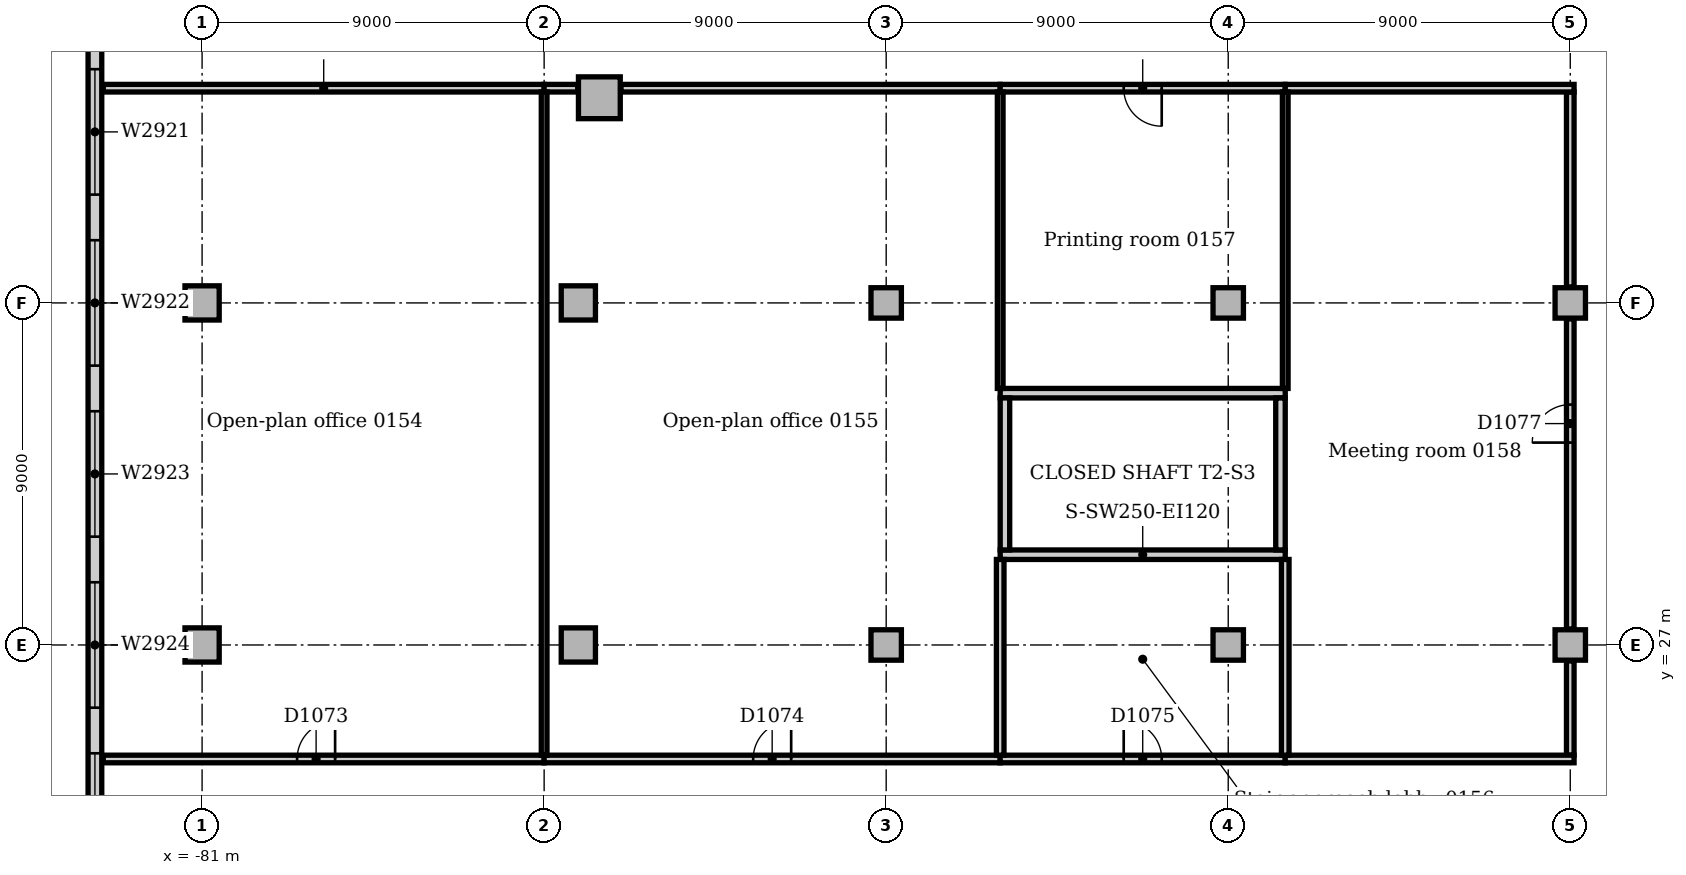
"""IFC4 building model, lengths in metres.
Left out: names, types, materials, properties, quantities, classifications, styles, units other than length and angle.
Written with IfcOpenShell. Run it as: python <this file> out.ifc"""

import sys

from ifc_helpers import new_model, si_unit, direction, frame, frame_2d, origin, origin_2d, place, context, subcontext, project, spatial, rectangle, extrude, element, fill, save


model = new_model("IFC4")
c1 = context("Model", 3, precision=1e-05, world=origin(), true_north=direction((0.0, 1.0)))
c2 = subcontext(c1, "Body", "Model", "MODEL_VIEW")
j1 = project(units=[si_unit("LENGTHUNIT", "METRE"), si_unit("PLANEANGLEUNIT", "RADIAN")], contexts=[c1])
p1 = place(None, origin())
s1 = spatial("IfcSite", under=j1, at=p1, CompositionType="ELEMENT")
p2 = place(p1, origin())
s2 = spatial("IfcBuilding", under=s1, at=p2, CompositionType="ELEMENT")
p3 = place(p2, frame((0.0, 0.0, 6.0)))
s3 = spatial("IfcBuildingStorey", under=s2, at=p3, CompositionType="ELEMENT", Elevation=6.0)
for number, where, z_axis, x_axis in (
    (1, (-60.0, 29.375, 0.0), (0.0, 0.0, 1.0), (1.0, 0.0, 0.0)),
    (2, (-52.5, 33.625, 0.0), (0.0, 0.0, 1.0), (-1.0, 0.0, 0.0)),
):
    element("IfcWall", number, at=place(p3, frame(where, z_axis=z_axis, x_axis=x_axis)), inside=s3, PredefinedType="SOLIDWALL", context=c2, shape_type="SweptSolid", body=[
        extrude(rectangle(XDim=7.5, YDim=0.25, at=frame_2d((3.75, 0.0))), origin(), (0.0, 0.0, 1.0), 5.0),
    ])
for number, where, z_axis, x_axis in (
    (3, (-52.625, 29.5, 0.0), (0.0, 0.0, 1.0), (0.0, 1.0, 0.0)),
    (4, (-59.875, 33.5, 0.0), (0.0, 0.0, 1.0), (0.0, -1.0, 0.0)),
):
    element("IfcWall", number, at=place(p3, frame(where, z_axis=z_axis, x_axis=x_axis)), inside=s3, PredefinedType="SOLIDWALL", context=c2, shape_type="SweptSolid", body=[
        extrude(rectangle(XDim=4.0, YDim=0.25, at=frame_2d((2.0, 0.0))), origin(), (0.0, 0.0, 1.0), 5.0),
    ])
p4 = place(p3, frame((-70.547, 41.398, 0.0), z_axis=(0.0, 0.0, 1.0), x_axis=(1.0, 0.0, 0.0)))
e5 = element("IfcColumn", 5, at=p4, inside=s3, PredefinedType="COLUMN", context=c2, shape_type="SweptSolid", body=[
    extrude(rectangle(XDim=1.1, YDim=1.1, at=origin_2d()), origin(), (0.0, 0.0, 1.0), 4.7),
])
for number, where, z_axis, x_axis in (
    (6, (-71.1, 27.0, 0.0), (0.0, 0.0, 1.0), (1.0, 0.0, 0.0)),
    (7, (-71.1, 36.0, 0.0), (0.0, 0.0, 1.0), (1.0, 0.0, 0.0)),
):
    element("IfcColumn", number, at=place(p3, frame(where, z_axis=z_axis, x_axis=x_axis)), inside=s3, PredefinedType="COLUMN", context=c2, shape_type="SweptSolid", body=[
        extrude(rectangle(XDim=0.9, YDim=0.9, at=origin_2d()), origin(), (0.0, 0.0, 1.0), 4.7),
    ])
for number, where, z_axis, x_axis in (
    (8, (-63.0, 27.0, 0.0), (0.0, 0.0, 1.0), (1.0, 0.0, 0.0)),
    (9, (-63.0, 36.0, 0.0), (0.0, 0.0, 1.0), (1.0, 0.0, 0.0)),
    (10, (-54.0, 27.0, 0.0), (0.0, 0.0, 1.0), (1.0, 0.0, 0.0)),
    (11, (-54.0, 36.0, 0.0), (0.0, 0.0, 1.0), (1.0, 0.0, 0.0)),
    (12, (-45.0, 27.0, 0.0), (0.0, 0.0, 1.0), (1.0, 0.0, 0.0)),
    (13, (-45.0, 36.0, 0.0), (0.0, 0.0, 1.0), (1.0, 0.0, 0.0)),
):
    element("IfcColumn", number, at=place(p3, frame(where, z_axis=z_axis, x_axis=x_axis)), inside=s3, PredefinedType="COLUMN", context=c2, shape_type="SweptSolid", body=[
        extrude(rectangle(XDim=0.8, YDim=0.8, at=origin_2d()), origin(), (0.0, 0.0, 1.0), 4.7),
    ])
for number, where, z_axis, x_axis in (
    (14, (-81.0, 27.0, 0.0), (0.0, 0.0, 1.0), (1.0, 0.0, 0.0)),
    (15, (-81.0, 36.0, 0.0), (0.0, 0.0, 1.0), (1.0, 0.0, 0.0)),
):
    element("IfcColumn", number, at=place(p3, frame(where, z_axis=z_axis, x_axis=x_axis)), inside=s3, PredefinedType="COLUMN", context=c2, shape_type="SweptSolid", body=[
        extrude(rectangle(XDim=0.9, YDim=0.9, at=origin_2d()), origin(), (0.0, 0.0, 1.0), 4.7),
    ])
p5 = place(p3, frame((-83.82, 54.0, 0.0), z_axis=(0.0, 0.0, 1.0), x_axis=(0.0, -1.0, 0.0)))
e16 = element("IfcWall", 16, at=p5, inside=s3, PredefinedType="STANDARD", context=c2, shape_type="SweptSolid", body=[
    extrude(rectangle(XDim=63.0, YDim=0.36, at=frame_2d((31.5, 0.0))), origin(), (0.0, 0.0, 1.0), 4.7),
])
p6 = place(p5, frame((2.85, 0.0, 0.9)))
e17 = element("IfcOpeningElement", 17, at=p6, cuts=e16, PredefinedType="OPENING", context=c2, shape_type="SweptSolid", body=[
    extrude(rectangle(XDim=3.3, YDim=2.4, at=frame_2d((1.65, 1.2))), frame((0.0, 0.19, 0.0), z_axis=(0.0, -1.0, 0.0), x_axis=(1.0, 0.0, 0.0)), (0.0, 0.0, 1.0), 0.38),
])
p7 = place(p5, frame((7.35, 0.0, 0.9)))
e18 = element("IfcOpeningElement", 18, at=p7, cuts=e16, PredefinedType="OPENING", context=c2, shape_type="SweptSolid", body=[
    extrude(rectangle(XDim=3.3, YDim=2.4, at=frame_2d((1.65, 1.2))), frame((0.0, 0.19, 0.0), z_axis=(0.0, -1.0, 0.0), x_axis=(1.0, 0.0, 0.0)), (0.0, 0.0, 1.0), 0.38),
])
p8 = place(p5, frame((11.85, 0.0, 0.9)))
e19 = element("IfcOpeningElement", 19, at=p8, cuts=e16, PredefinedType="OPENING", context=c2, shape_type="SweptSolid", body=[
    extrude(rectangle(XDim=3.3, YDim=2.4, at=frame_2d((1.65, 1.2))), frame((0.0, 0.19, 0.0), z_axis=(0.0, -1.0, 0.0), x_axis=(1.0, 0.0, 0.0)), (0.0, 0.0, 1.0), 0.38),
])
p9 = place(p5, frame((16.35, 0.0, 0.9)))
e20 = element("IfcOpeningElement", 20, at=p9, cuts=e16, PredefinedType="OPENING", context=c2, shape_type="SweptSolid", body=[
    extrude(rectangle(XDim=3.3, YDim=2.4, at=frame_2d((1.65, 1.2))), frame((0.0, 0.19, 0.0), z_axis=(0.0, -1.0, 0.0), x_axis=(1.0, 0.0, 0.0)), (0.0, 0.0, 1.0), 0.38),
])
p10 = place(p5, frame((20.85, 0.0, 0.9)))
e21 = element("IfcOpeningElement", 21, at=p10, cuts=e16, PredefinedType="OPENING", context=c2, shape_type="SweptSolid", body=[
    extrude(rectangle(XDim=3.3, YDim=2.4, at=frame_2d((1.65, 1.2))), frame((0.0, 0.19, 0.0), z_axis=(0.0, -1.0, 0.0), x_axis=(1.0, 0.0, 0.0)), (0.0, 0.0, 1.0), 0.38),
])
p11 = place(p5, frame((25.35, 0.0, 0.9)))
e22 = element("IfcOpeningElement", 22, at=p11, cuts=e16, PredefinedType="OPENING", context=c2, shape_type="SweptSolid", body=[
    extrude(rectangle(XDim=3.3, YDim=2.4, at=frame_2d((1.65, 1.2))), frame((0.0, 0.19, 0.0), z_axis=(0.0, -1.0, 0.0), x_axis=(1.0, 0.0, 0.0)), (0.0, 0.0, 1.0), 0.38),
])
p12 = place(p5, frame((29.85, 0.0, 0.9)))
e23 = element("IfcOpeningElement", 23, at=p12, cuts=e16, PredefinedType="OPENING", context=c2, shape_type="SweptSolid", body=[
    extrude(rectangle(XDim=3.3, YDim=2.4, at=frame_2d((1.65, 1.2))), frame((0.0, 0.19, 0.0), z_axis=(0.0, -1.0, 0.0), x_axis=(1.0, 0.0, 0.0)), (0.0, 0.0, 1.0), 0.38),
])
p13 = place(p5, frame((34.35, 0.0, 0.9)))
e24 = element("IfcOpeningElement", 24, at=p13, cuts=e16, PredefinedType="OPENING", context=c2, shape_type="SweptSolid", body=[
    extrude(rectangle(XDim=3.3, YDim=2.4, at=frame_2d((1.65, 1.2))), frame((0.0, 0.19, 0.0), z_axis=(0.0, -1.0, 0.0), x_axis=(1.0, 0.0, 0.0)), (0.0, 0.0, 1.0), 0.38),
])
p14 = place(p5, frame((38.85, 0.0, 0.9)))
e25 = element("IfcOpeningElement", 25, at=p14, cuts=e16, PredefinedType="OPENING", context=c2, shape_type="SweptSolid", body=[
    extrude(rectangle(XDim=3.3, YDim=2.4, at=frame_2d((1.65, 1.2))), frame((0.0, 0.19, 0.0), z_axis=(0.0, -1.0, 0.0), x_axis=(1.0, 0.0, 0.0)), (0.0, 0.0, 1.0), 0.38),
])
p15 = place(p5, frame((43.35, 0.0, 0.9)))
e26 = element("IfcOpeningElement", 26, at=p15, cuts=e16, PredefinedType="OPENING", context=c2, shape_type="SweptSolid", body=[
    extrude(rectangle(XDim=3.3, YDim=2.4, at=frame_2d((1.65, 1.2))), frame((0.0, 0.19, 0.0), z_axis=(0.0, -1.0, 0.0), x_axis=(1.0, 0.0, 0.0)), (0.0, 0.0, 1.0), 0.38),
])
p16 = place(p5, frame((47.85, 0.0, 0.9)))
e27 = element("IfcOpeningElement", 27, at=p16, cuts=e16, PredefinedType="OPENING", context=c2, shape_type="SweptSolid", body=[
    extrude(rectangle(XDim=3.3, YDim=2.4, at=frame_2d((1.65, 1.2))), frame((0.0, 0.19, 0.0), z_axis=(0.0, -1.0, 0.0), x_axis=(1.0, 0.0, 0.0)), (0.0, 0.0, 1.0), 0.38),
])
p17 = place(p5, frame((52.35, 0.0, 0.9)))
e28 = element("IfcOpeningElement", 28, at=p17, cuts=e16, PredefinedType="OPENING", context=c2, shape_type="SweptSolid", body=[
    extrude(rectangle(XDim=3.3, YDim=2.4, at=frame_2d((1.65, 1.2))), frame((0.0, 0.19, 0.0), z_axis=(0.0, -1.0, 0.0), x_axis=(1.0, 0.0, 0.0)), (0.0, 0.0, 1.0), 0.38),
])
p18 = place(p5, frame((56.85, 0.0, 0.9)))
e29 = element("IfcOpeningElement", 29, at=p18, cuts=e16, PredefinedType="OPENING", context=c2, shape_type="SweptSolid", body=[
    extrude(rectangle(XDim=3.3, YDim=2.4, at=frame_2d((1.65, 1.2))), frame((0.0, 0.19, 0.0), z_axis=(0.0, -1.0, 0.0), x_axis=(1.0, 0.0, 0.0)), (0.0, 0.0, 1.0), 0.38),
])
p19 = place(p3, frame((-45.0, 24.1, 0.0), z_axis=(0.0, 0.0, 1.0), x_axis=(0.0, 1.0, 0.0)))
e30 = element("IfcWall", 30, at=p19, inside=s3, PredefinedType="PARTITIONING", context=c2, shape_type="SweptSolid", body=[
    extrude(rectangle(XDim=2.48, YDim=0.2, at=frame_2d((1.24, 0.0))), origin(), (0.0, 0.0, 1.0), 4.7),
])
p20 = place(p3, frame((-45.0, 27.42, 0.0), z_axis=(0.0, 0.0, 1.0), x_axis=(0.0, 1.0, 0.0)))
e31 = element("IfcWall", 31, at=p20, inside=s3, PredefinedType="PARTITIONING", context=c2, shape_type="SweptSolid", body=[
    extrude(rectangle(XDim=8.16, YDim=0.2, at=frame_2d((4.08, 0.0))), origin(), (0.0, 0.0, 1.0), 4.7),
])
p21 = place(p20, frame((4.905, 0.0, 0.0)))
e32 = element("IfcOpeningElement", 32, at=p21, cuts=e31, PredefinedType="OPENING", context=c2, shape_type="SweptSolid", body=[
    extrude(rectangle(XDim=1.0, YDim=2.1, at=frame_2d((0.5, 1.05))), frame((0.0, 0.11, 0.0), z_axis=(0.0, -1.0, 0.0), x_axis=(1.0, 0.0, 0.0)), (0.0, 0.0, 1.0), 0.22),
])
p22 = place(p3, frame((-45.0, 36.42, 0.0), z_axis=(0.0, 0.0, 1.0), x_axis=(0.0, 1.0, 0.0)))
e33 = element("IfcWall", 33, at=p22, inside=s3, PredefinedType="PARTITIONING", context=c2, shape_type="SweptSolid", body=[
    extrude(rectangle(XDim=5.13, YDim=0.2, at=frame_2d((2.565, 0.0))), origin(), (0.0, 0.0, 1.0), 4.7),
])
p23 = place(p3, frame((-83.6, 24.0, 0.0), z_axis=(0.0, 0.0, 1.0), x_axis=(1.0, 0.0, 0.0)))
e34 = element("IfcWall", 34, at=p23, inside=s3, PredefinedType="PARTITIONING", context=c2, shape_type="SweptSolid", body=[
    extrude(rectangle(XDim=11.6, YDim=0.2, at=frame_2d((5.8, 0.0))), origin(), (0.0, 0.0, 1.0), 4.7),
])
p24 = place(p23, frame((5.1, 0.0, 0.0)))
e35 = element("IfcOpeningElement", 35, at=p24, cuts=e34, PredefinedType="OPENING", context=c2, shape_type="SweptSolid", body=[
    extrude(rectangle(XDim=1.0, YDim=2.1, at=frame_2d((0.5, 1.05))), frame((0.0, 0.11, 0.0), z_axis=(0.0, -1.0, 0.0), x_axis=(1.0, 0.0, 0.0)), (0.0, 0.0, 1.0), 0.22),
])
p25 = place(p3, frame((-72.0, 24.0, 0.0), z_axis=(0.0, 0.0, 1.0), x_axis=(1.0, 0.0, 0.0)))
e36 = element("IfcWall", 36, at=p25, inside=s3, PredefinedType="PARTITIONING", context=c2, shape_type="SweptSolid", body=[
    extrude(rectangle(XDim=12.0, YDim=0.2, at=frame_2d((6.0, 0.0))), origin(), (0.0, 0.0, 1.0), 4.7),
])
p26 = place(p25, frame((5.5, 0.0, 0.0)))
e37 = element("IfcOpeningElement", 37, at=p26, cuts=e36, PredefinedType="OPENING", context=c2, shape_type="SweptSolid", body=[
    extrude(rectangle(XDim=1.0, YDim=2.1, at=frame_2d((0.5, 1.05))), frame((0.0, 0.11, 0.0), z_axis=(0.0, -1.0, 0.0), x_axis=(1.0, 0.0, 0.0)), (0.0, 0.0, 1.0), 0.22),
])
p27 = place(p3, frame((-60.0, 24.0, 0.0), z_axis=(0.0, 0.0, 1.0), x_axis=(1.0, 0.0, 0.0)))
e38 = element("IfcWall", 38, at=p27, inside=s3, PredefinedType="PARTITIONING", context=c2, shape_type="SweptSolid", body=[
    extrude(rectangle(XDim=7.5, YDim=0.2, at=frame_2d((3.75, 0.0))), origin(), (0.0, 0.0, 1.0), 4.7),
])
p28 = place(p27, frame((3.25, 0.0, 0.0)))
e39 = element("IfcOpeningElement", 39, at=p28, cuts=e38, PredefinedType="OPENING", context=c2, shape_type="SweptSolid", body=[
    extrude(rectangle(XDim=1.0, YDim=2.1, at=frame_2d((0.5, 1.05))), frame((0.0, 0.11, 0.0), z_axis=(0.0, -1.0, 0.0), x_axis=(1.0, 0.0, 0.0)), (0.0, 0.0, 1.0), 0.22),
])
p29 = place(p3, frame((-52.5, 24.0, 0.0), z_axis=(0.0, 0.0, 1.0), x_axis=(1.0, 0.0, 0.0)))
e40 = element("IfcWall", 40, at=p29, inside=s3, PredefinedType="PARTITIONING", context=c2, shape_type="SweptSolid", body=[
    extrude(rectangle(XDim=7.6, YDim=0.2, at=frame_2d((3.8, 0.0))), origin(), (0.0, 0.0, 1.0), 4.7),
])
p30 = place(p3, frame((-83.6, 41.65, 0.0), z_axis=(0.0, 0.0, 1.0), x_axis=(1.0, 0.0, 0.0)))
e41 = element("IfcWall", 41, at=p30, inside=s3, PredefinedType="PARTITIONING", context=c2, shape_type="SweptSolid", body=[
    extrude(rectangle(XDim=11.6, YDim=0.2, at=frame_2d((5.8, 0.0))), origin(), (0.0, 0.0, 1.0), 4.7),
])
p31 = place(p3, frame((-72.0, 41.65, 0.0), z_axis=(0.0, 0.0, 1.0), x_axis=(1.0, 0.0, 0.0)))
e42 = element("IfcWall", 42, at=p31, inside=s3, PredefinedType="PARTITIONING", context=c2, shape_type="SweptSolid", body=[
    extrude(rectangle(XDim=0.883, YDim=0.2, at=frame_2d((0.442, 0.0))), origin(), (0.0, 0.0, 1.0), 4.7),
])
p32 = place(p3, frame((-69.977, 41.65, 0.0), z_axis=(0.0, 0.0, 1.0), x_axis=(1.0, 0.0, 0.0)))
e43 = element("IfcWall", 43, at=p32, inside=s3, PredefinedType="PARTITIONING", context=c2, shape_type="SweptSolid", body=[
    extrude(rectangle(XDim=9.977, YDim=0.2, at=frame_2d((4.989, 0.0))), origin(), (0.0, 0.0, 1.0), 4.7),
])
p33 = place(p3, frame((-60.0, 41.65, 0.0), z_axis=(0.0, 0.0, 1.0), x_axis=(1.0, 0.0, 0.0)))
e44 = element("IfcWall", 44, at=p33, inside=s3, PredefinedType="PARTITIONING", context=c2, shape_type="SweptSolid", body=[
    extrude(rectangle(XDim=7.5, YDim=0.2, at=frame_2d((3.75, 0.0))), origin(), (0.0, 0.0, 1.0), 4.7),
])
p34 = place(p33, frame((3.25, 0.0, 0.0)))
e45 = element("IfcOpeningElement", 45, at=p34, cuts=e44, PredefinedType="OPENING", context=c2, shape_type="SweptSolid", body=[
    extrude(rectangle(XDim=1.0, YDim=2.1, at=frame_2d((0.5, 1.05))), frame((0.0, 0.11, 0.0), z_axis=(0.0, -1.0, 0.0), x_axis=(1.0, 0.0, 0.0)), (0.0, 0.0, 1.0), 0.22),
])
p35 = place(p3, frame((-52.5, 41.65, 0.0), z_axis=(0.0, 0.0, 1.0), x_axis=(1.0, 0.0, 0.0)))
e46 = element("IfcWall", 46, at=p35, inside=s3, PredefinedType="PARTITIONING", context=c2, shape_type="SweptSolid", body=[
    extrude(rectangle(XDim=7.6, YDim=0.2, at=frame_2d((3.8, 0.0))), origin(), (0.0, 0.0, 1.0), 4.7),
])
p36 = place(p3, frame((-72.0, 24.1, 0.0), z_axis=(0.0, 0.0, 1.0), x_axis=(0.0, 1.0, 0.0)))
e47 = element("IfcWall", 47, at=p36, inside=s3, PredefinedType="PARTITIONING", context=c2, shape_type="SweptSolid", body=[
    extrude(rectangle(XDim=17.45, YDim=0.15, at=frame_2d((8.725, 0.0))), origin(), (0.0, 0.0, 1.0), 4.7),
])
p37 = place(p3, frame((-60.0, 24.1, 0.0), z_axis=(0.0, 0.0, 1.0), x_axis=(0.0, 1.0, 0.0)))
e48 = element("IfcWall", 48, at=p37, inside=s3, PredefinedType="PARTITIONING", context=c2, shape_type="SweptSolid", body=[
    extrude(rectangle(XDim=5.15, YDim=0.2, at=frame_2d((2.575, 0.0))), origin(), (0.0, 0.0, 1.0), 4.7),
])
p38 = place(p3, frame((-60.0, 33.75, 0.0), z_axis=(0.0, 0.0, 1.0), x_axis=(0.0, 1.0, 0.0)))
e49 = element("IfcWall", 49, at=p38, inside=s3, PredefinedType="PARTITIONING", context=c2, shape_type="SweptSolid", body=[
    extrude(rectangle(XDim=7.8, YDim=0.15, at=frame_2d((3.9, 0.0))), origin(), (0.0, 0.0, 1.0), 4.7),
])
p39 = place(p3, frame((-52.5, 24.1, 0.0), z_axis=(0.0, 0.0, 1.0), x_axis=(0.0, 1.0, 0.0)))
e50 = element("IfcWall", 50, at=p39, inside=s3, PredefinedType="PARTITIONING", context=c2, shape_type="SweptSolid", body=[
    extrude(rectangle(XDim=5.15, YDim=0.2, at=frame_2d((2.575, 0.0))), origin(), (0.0, 0.0, 1.0), 4.7),
])
p40 = place(p3, frame((-52.5, 33.75, 0.0), z_axis=(0.0, 0.0, 1.0), x_axis=(0.0, 1.0, 0.0)))
e51 = element("IfcWall", 51, at=p40, inside=s3, PredefinedType="PARTITIONING", context=c2, shape_type="SweptSolid", body=[
    extrude(rectangle(XDim=7.8, YDim=0.15, at=frame_2d((3.9, 0.0))), origin(), (0.0, 0.0, 1.0), 4.7),
])
p41 = place(p8, origin())
e52 = element("IfcWindow", 52, at=p41, inside=s3, PartitioningType="SINGLE_PANEL", PredefinedType="WINDOW", context=c2, shape_type="SweptSolid", body=[
    extrude(rectangle(XDim=3.3, YDim=2.4, at=frame_2d((1.65, 1.2))), frame((0.0, 0.13, 0.0), z_axis=(0.0, -1.0, 0.0), x_axis=(1.0, 0.0, 0.0)), (0.0, 0.0, 1.0), 0.06),
])
fill(e19, e52)
p42 = place(p9, origin())
e53 = element("IfcWindow", 53, at=p42, inside=s3, PartitioningType="SINGLE_PANEL", PredefinedType="WINDOW", context=c2, shape_type="SweptSolid", body=[
    extrude(rectangle(XDim=3.3, YDim=2.4, at=frame_2d((1.65, 1.2))), frame((0.0, 0.13, 0.0), z_axis=(0.0, -1.0, 0.0), x_axis=(1.0, 0.0, 0.0)), (0.0, 0.0, 1.0), 0.06),
])
fill(e20, e53)
p43 = place(p10, origin())
e54 = element("IfcWindow", 54, at=p43, inside=s3, PartitioningType="SINGLE_PANEL", PredefinedType="WINDOW", context=c2, shape_type="SweptSolid", body=[
    extrude(rectangle(XDim=3.3, YDim=2.4, at=frame_2d((1.65, 1.2))), frame((0.0, 0.13, 0.0), z_axis=(0.0, -1.0, 0.0), x_axis=(1.0, 0.0, 0.0)), (0.0, 0.0, 1.0), 0.06),
])
fill(e21, e54)
p44 = place(p11, origin())
e55 = element("IfcWindow", 55, at=p44, inside=s3, PartitioningType="SINGLE_PANEL", PredefinedType="WINDOW", context=c2, shape_type="SweptSolid", body=[
    extrude(rectangle(XDim=3.3, YDim=2.4, at=frame_2d((1.65, 1.2))), frame((0.0, 0.13, 0.0), z_axis=(0.0, -1.0, 0.0), x_axis=(1.0, 0.0, 0.0)), (0.0, 0.0, 1.0), 0.06),
])
fill(e22, e55)
p45 = place(p12, origin())
e56 = element("IfcWindow", 56, at=p45, inside=s3, PartitioningType="SINGLE_PANEL", PredefinedType="WINDOW", context=c2, shape_type="SweptSolid", body=[
    extrude(rectangle(XDim=3.3, YDim=2.4, at=frame_2d((1.65, 1.2))), frame((0.0, 0.13, 0.0), z_axis=(0.0, -1.0, 0.0), x_axis=(1.0, 0.0, 0.0)), (0.0, 0.0, 1.0), 0.06),
])
fill(e23, e56)
p46 = place(p24, origin())
e57 = element("IfcDoor", 57, at=p46, inside=s3, OperationType="SINGLE_SWING_RIGHT", PredefinedType="DOOR", context=c2, shape_type="SweptSolid", body=[
    extrude(rectangle(XDim=1.0, YDim=2.1, at=frame_2d((0.5, 1.05))), frame((0.0, 0.025, 0.0), z_axis=(0.0, -1.0, 0.0), x_axis=(1.0, 0.0, 0.0)), (0.0, 0.0, 1.0), 0.05),
])
fill(e35, e57)
p47 = place(p26, origin())
e58 = element("IfcDoor", 58, at=p47, inside=s3, OperationType="SINGLE_SWING_RIGHT", PredefinedType="DOOR", context=c2, shape_type="SweptSolid", body=[
    extrude(rectangle(XDim=1.0, YDim=2.1, at=frame_2d((0.5, 1.05))), frame((0.0, 0.025, 0.0), z_axis=(0.0, -1.0, 0.0), x_axis=(1.0, 0.0, 0.0)), (0.0, 0.0, 1.0), 0.05),
])
fill(e37, e58)
p48 = place(p28, origin())
e59 = element("IfcDoor", 59, at=p48, inside=s3, OperationType="SINGLE_SWING_LEFT", PredefinedType="DOOR", context=c2, shape_type="SweptSolid", body=[
    extrude(rectangle(XDim=1.0, YDim=2.1, at=frame_2d((0.5, 1.05))), frame((0.0, 0.025, 0.0), z_axis=(0.0, -1.0, 0.0), x_axis=(1.0, 0.0, 0.0)), (0.0, 0.0, 1.0), 0.05),
])
fill(e39, e59)
p49 = place(p34, frame((1.0, 0.0, 0.0), z_axis=(0.0, 0.0, 1.0), x_axis=(-1.0, 0.0, 0.0)))
e60 = element("IfcDoor", 60, at=p49, inside=s3, OperationType="SINGLE_SWING_LEFT", PredefinedType="DOOR", context=c2, shape_type="SweptSolid", body=[
    extrude(rectangle(XDim=1.0, YDim=2.1, at=frame_2d((0.5, 1.05))), frame((0.0, 0.025, 0.0), z_axis=(0.0, -1.0, 0.0), x_axis=(1.0, 0.0, 0.0)), (0.0, 0.0, 1.0), 0.05),
])
fill(e45, e60)
p50 = place(p21, origin())
e61 = element("IfcDoor", 61, at=p50, inside=s3, OperationType="SINGLE_SWING_LEFT", PredefinedType="DOOR", context=c2, shape_type="SweptSolid", body=[
    extrude(rectangle(XDim=1.0, YDim=2.1, at=frame_2d((0.5, 1.05))), frame((0.0, 0.025, 0.0), z_axis=(0.0, -1.0, 0.0), x_axis=(1.0, 0.0, 0.0)), (0.0, 0.0, 1.0), 0.05),
])
fill(e32, e61)
save(model, sys.argv[1])
